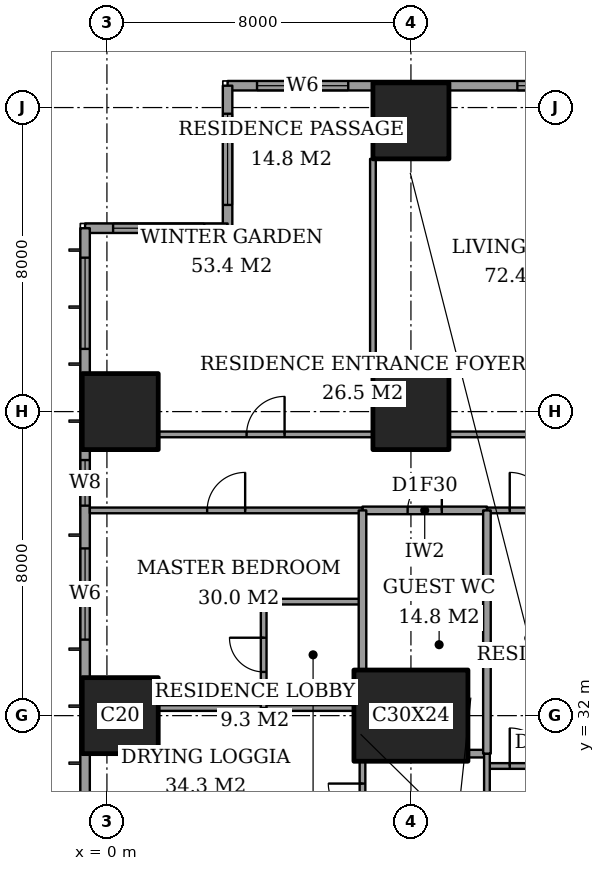
"""IFC4 building model, lengths in metres.
Left out: names, types, materials, properties, quantities, classifications, styles, units other than length and angle.
Written with IfcOpenShell. Run it as: python <this file> out.ifc"""

import sys

from ifc_helpers import new_model, si_unit, direction, frame, frame_2d, origin, origin_2d, place, context, subcontext, project, spatial, rectangle, extrude, element, fill, save


model = new_model("IFC4")
c1 = context("Model", 3, precision=1e-05, world=origin(), true_north=direction((0.0, 1.0)))
c2 = subcontext(c1, "Body", "Model", "MODEL_VIEW")
j1 = project(units=[si_unit("LENGTHUNIT", "METRE"), si_unit("PLANEANGLEUNIT", "RADIAN")], contexts=[c1])
p1 = place(None, origin())
s1 = spatial("IfcSite", under=j1, at=p1, CompositionType="ELEMENT")
p2 = place(p1, origin())
s2 = spatial("IfcBuilding", under=s1, at=p2, CompositionType="ELEMENT")
p3 = place(p2, frame((0.0, 0.0, 83.6)))
s3 = spatial("IfcBuildingStorey", under=s2, at=p3, CompositionType="ELEMENT", Elevation=83.6)
for number, where, z_axis, x_axis in (
    (1, (0.35, 32.0, 0.0), (0.0, 0.0, 1.0), (1.0, 0.0, 0.0)),
    (2, (0.35, 40.0, 0.0), (0.0, 0.0, 1.0), (1.0, 0.0, 0.0)),
):
    element("IfcColumn", number, at=place(p3, frame(where, z_axis=z_axis, x_axis=x_axis)), inside=s3, PredefinedType="COLUMN", context=c2, shape_type="SweptSolid", body=[
        extrude(rectangle(XDim=2.0, YDim=2.0, at=origin_2d()), origin(), (0.0, 0.0, 1.0), 3.6),
    ])
p4 = place(p3, frame((8.0, 32.0, 0.0), z_axis=(0.0, 0.0, 1.0), x_axis=(1.0, 0.0, 0.0)))
e3 = element("IfcColumn", 3, at=p4, inside=s3, PredefinedType="COLUMN", context=c2, shape_type="SweptSolid", body=[
    extrude(rectangle(XDim=3.0, YDim=2.4, at=origin_2d()), origin(), (0.0, 0.0, 1.0), 3.6),
])
for number, where, z_axis, x_axis in (
    (4, (8.0, 40.0, 0.0), (0.0, 0.0, 1.0), (1.0, 0.0, 0.0)),
    (5, (8.0, 47.65, 0.0), (0.0, 0.0, 1.0), (1.0, 0.0, 0.0)),
):
    element("IfcColumn", number, at=place(p3, frame(where, z_axis=z_axis, x_axis=x_axis)), inside=s3, PredefinedType="COLUMN", context=c2, shape_type="SweptSolid", body=[
        extrude(rectangle(XDim=2.0, YDim=2.0, at=origin_2d()), origin(), (0.0, 0.0, 1.0), 3.6),
    ])
p5 = place(p3, frame((24.575, 48.575, 0.0), z_axis=(0.0, 0.0, 1.0), x_axis=(-1.0, 0.0, 0.0)))
e6 = element("IfcWall", 6, at=p5, inside=s3, PredefinedType="SOLIDWALL", context=c2, shape_type="SweptSolid", body=[
    extrude(rectangle(XDim=21.4, YDim=0.25, at=frame_2d((10.7, 0.0))), origin(), (0.0, 0.0, 1.0), 3.6),
])
p6 = place(p5, frame((2.35, 0.0, 0.6)))
e7 = element("IfcOpeningElement", 7, at=p6, cuts=e6, PredefinedType="OPENING", context=c2, shape_type="SweptSolid", body=[
    extrude(rectangle(XDim=1.2, YDim=2.0, at=frame_2d((0.6, 1.0))), frame((0.0, 0.135, 0.0), z_axis=(0.0, -1.0, 0.0), x_axis=(1.0, 0.0, 0.0)), (0.0, 0.0, 1.0), 0.27),
])
p7 = place(p5, frame((4.25, 0.0, 0.6)))
e8 = element("IfcOpeningElement", 8, at=p7, cuts=e6, PredefinedType="OPENING", context=c2, shape_type="SweptSolid", body=[
    extrude(rectangle(XDim=1.2, YDim=2.0, at=frame_2d((0.6, 1.0))), frame((0.0, 0.135, 0.0), z_axis=(0.0, -1.0, 0.0), x_axis=(1.0, 0.0, 0.0)), (0.0, 0.0, 1.0), 0.27),
])
p8 = place(p5, frame((5.975, 0.0, 0.6)))
e9 = element("IfcOpeningElement", 9, at=p8, cuts=e6, PredefinedType="OPENING", context=c2, shape_type="SweptSolid", body=[
    extrude(rectangle(XDim=1.2, YDim=2.0, at=frame_2d((0.6, 1.0))), frame((0.0, 0.135, 0.0), z_axis=(0.0, -1.0, 0.0), x_axis=(1.0, 0.0, 0.0)), (0.0, 0.0, 1.0), 0.27),
])
p9 = place(p5, frame((11.375, 0.0, 0.6)))
e10 = element("IfcOpeningElement", 10, at=p9, cuts=e6, PredefinedType="OPENING", context=c2, shape_type="SweptSolid", body=[
    extrude(rectangle(XDim=2.4, YDim=2.0, at=frame_2d((1.2, 1.0))), frame((0.0, 0.135, 0.0), z_axis=(0.0, -1.0, 0.0), x_axis=(1.0, 0.0, 0.0)), (0.0, 0.0, 1.0), 0.27),
])
p10 = place(p5, frame((18.225, 0.0, 0.6)))
e11 = element("IfcOpeningElement", 11, at=p10, cuts=e6, PredefinedType="OPENING", context=c2, shape_type="SweptSolid", body=[
    extrude(rectangle(XDim=2.4, YDim=2.0, at=frame_2d((1.2, 1.0))), frame((0.0, 0.135, 0.0), z_axis=(0.0, -1.0, 0.0), x_axis=(1.0, 0.0, 0.0)), (0.0, 0.0, 1.0), 0.27),
])
p11 = place(p3, frame((3.175, 48.575, 0.0), z_axis=(0.0, 0.0, 1.0), x_axis=(0.0, -1.0, 0.0)))
e12 = element("IfcWall", 12, at=p11, inside=s3, PredefinedType="SOLIDWALL", context=c2, shape_type="SweptSolid", body=[
    extrude(rectangle(XDim=3.75, YDim=0.25, at=frame_2d((1.875, 0.0))), origin(), (0.0, 0.0, 1.0), 3.6),
])
p12 = place(p11, frame((0.738, 0.0, 0.6)))
e13 = element("IfcOpeningElement", 13, at=p12, cuts=e12, PredefinedType="OPENING", context=c2, shape_type="SweptSolid", body=[
    extrude(rectangle(XDim=2.4, YDim=2.0, at=frame_2d((1.2, 1.0))), frame((0.0, 0.135, 0.0), z_axis=(0.0, -1.0, 0.0), x_axis=(1.0, 0.0, 0.0)), (0.0, 0.0, 1.0), 0.27),
])
p13 = place(p3, frame((3.175, 44.825, 0.0), z_axis=(0.0, 0.0, 1.0), x_axis=(-1.0, 0.0, 0.0)))
e14 = element("IfcWall", 14, at=p13, inside=s3, PredefinedType="SOLIDWALL", context=c2, shape_type="SweptSolid", body=[
    extrude(rectangle(XDim=3.75, YDim=0.25, at=frame_2d((1.875, 0.0))), origin(), (0.0, 0.0, 1.0), 3.6),
])
p14 = place(p13, frame((0.613, 0.0, 0.6)))
e15 = element("IfcOpeningElement", 15, at=p14, cuts=e14, PredefinedType="OPENING", context=c2, shape_type="SweptSolid", body=[
    extrude(rectangle(XDim=2.4, YDim=2.0, at=frame_2d((1.2, 1.0))), frame((0.0, 0.135, 0.0), z_axis=(0.0, -1.0, 0.0), x_axis=(1.0, 0.0, 0.0)), (0.0, 0.0, 1.0), 0.27),
])
p15 = place(p3, frame((-0.575, 44.825, 0.0), z_axis=(0.0, 0.0, 1.0), x_axis=(0.0, -1.0, 0.0)))
e16 = element("IfcWall", 16, at=p15, inside=s3, PredefinedType="SOLIDWALL", context=c2, shape_type="SweptSolid", body=[
    extrude(rectangle(XDim=41.65, YDim=0.25, at=frame_2d((20.825, 0.0))), origin(), (0.0, 0.0, 1.0), 3.6),
])
p16 = place(p15, frame((0.775, 0.0, 0.6)))
e17 = element("IfcOpeningElement", 17, at=p16, cuts=e16, PredefinedType="OPENING", context=c2, shape_type="SweptSolid", body=[
    extrude(rectangle(XDim=2.4, YDim=2.0, at=frame_2d((1.2, 1.0))), frame((0.0, 0.135, 0.0), z_axis=(0.0, -1.0, 0.0), x_axis=(1.0, 0.0, 0.0)), (0.0, 0.0, 1.0), 0.27),
])
p17 = place(p15, frame((6.1, 0.0, 0.6)))
e18 = element("IfcOpeningElement", 18, at=p17, cuts=e16, PredefinedType="OPENING", context=c2, shape_type="SweptSolid", body=[
    extrude(rectangle(XDim=1.2, YDim=2.0, at=frame_2d((0.6, 1.0))), frame((0.0, 0.135, 0.0), z_axis=(0.0, -1.0, 0.0), x_axis=(1.0, 0.0, 0.0)), (0.0, 0.0, 1.0), 0.27),
])
p18 = place(p15, frame((8.425, 0.0, 0.6)))
e19 = element("IfcOpeningElement", 19, at=p18, cuts=e16, PredefinedType="OPENING", context=c2, shape_type="SweptSolid", body=[
    extrude(rectangle(XDim=2.4, YDim=2.0, at=frame_2d((1.2, 1.0))), frame((0.0, 0.135, 0.0), z_axis=(0.0, -1.0, 0.0), x_axis=(1.0, 0.0, 0.0)), (0.0, 0.0, 1.0), 0.27),
])
p19 = place(p15, frame((15.625, 0.0, 0.6)))
e20 = element("IfcOpeningElement", 20, at=p19, cuts=e16, PredefinedType="OPENING", context=c2, shape_type="SweptSolid", body=[
    extrude(rectangle(XDim=2.4, YDim=2.0, at=frame_2d((1.2, 1.0))), frame((0.0, 0.135, 0.0), z_axis=(0.0, -1.0, 0.0), x_axis=(1.0, 0.0, 0.0)), (0.0, 0.0, 1.0), 0.27),
])
p20 = place(p15, frame((23.625, 0.0, 0.6)))
e21 = element("IfcOpeningElement", 21, at=p20, cuts=e16, PredefinedType="OPENING", context=c2, shape_type="SweptSolid", body=[
    extrude(rectangle(XDim=2.4, YDim=2.0, at=frame_2d((1.2, 1.0))), frame((0.0, 0.135, 0.0), z_axis=(0.0, -1.0, 0.0), x_axis=(1.0, 0.0, 0.0)), (0.0, 0.0, 1.0), 0.27),
])
p21 = place(p15, frame((30.825, 0.0, 0.6)))
e22 = element("IfcOpeningElement", 22, at=p21, cuts=e16, PredefinedType="OPENING", context=c2, shape_type="SweptSolid", body=[
    extrude(rectangle(XDim=2.4, YDim=2.0, at=frame_2d((1.2, 1.0))), frame((0.0, 0.135, 0.0), z_axis=(0.0, -1.0, 0.0), x_axis=(1.0, 0.0, 0.0)), (0.0, 0.0, 1.0), 0.27),
])
p22 = place(p15, frame((34.5, 0.0, 0.6)))
e23 = element("IfcOpeningElement", 23, at=p22, cuts=e16, PredefinedType="OPENING", context=c2, shape_type="SweptSolid", body=[
    extrude(rectangle(XDim=1.2, YDim=2.0, at=frame_2d((0.6, 1.0))), frame((0.0, 0.135, 0.0), z_axis=(0.0, -1.0, 0.0), x_axis=(1.0, 0.0, 0.0)), (0.0, 0.0, 1.0), 0.27),
])
p23 = place(p15, frame((38.475, 0.0, 0.6)))
e24 = element("IfcOpeningElement", 24, at=p23, cuts=e16, PredefinedType="OPENING", context=c2, shape_type="SweptSolid", body=[
    extrude(rectangle(XDim=2.4, YDim=2.0, at=frame_2d((1.2, 1.0))), frame((0.0, 0.135, 0.0), z_axis=(0.0, -1.0, 0.0), x_axis=(1.0, 0.0, 0.0)), (0.0, 0.0, 1.0), 0.27),
])
p24 = place(p3, frame((10.0, 30.675, 0.0), z_axis=(0.0, 0.0, 1.0), x_axis=(1.0, 0.0, 0.0)))
e25 = element("IfcWall", 25, at=p24, inside=s3, PredefinedType="PARTITIONING", context=c2, shape_type="SweptSolid", body=[
    extrude(rectangle(XDim=4.4, YDim=0.15, at=frame_2d((2.2, 0.0))), origin(), (0.0, 0.0, 1.0), 3.35),
])
p25 = place(p24, frame((0.6, 0.0, 0.0)))
e26 = element("IfcOpeningElement", 26, at=p25, cuts=e25, PredefinedType="OPENING", context=c2, shape_type="SweptSolid", body=[
    extrude(rectangle(XDim=1.0, YDim=2.1, at=frame_2d((0.5, 1.05))), frame((0.0, 0.085, 0.0), z_axis=(0.0, -1.0, 0.0), x_axis=(1.0, 0.0, 0.0)), (0.0, 0.0, 1.0), 0.17),
])
p26 = place(p3, frame((9.5, 31.0, 0.0), z_axis=(0.0, 0.0, 1.0), x_axis=(1.0, 0.0, 0.0)))
e27 = element("IfcWall", 27, at=p26, inside=s3, PredefinedType="PARTITIONING", context=c2, shape_type="SweptSolid", body=[
    extrude(rectangle(XDim=0.5, YDim=0.2, at=frame_2d((0.25, 0.0))), origin(), (0.0, 0.0, 1.0), 3.35),
])
p27 = place(p3, frame((1.35, 32.2, 0.0), z_axis=(0.0, 0.0, 1.0), x_axis=(1.0, 0.0, 0.0)))
e28 = element("IfcWall", 28, at=p27, inside=s3, PredefinedType="PARTITIONING", context=c2, shape_type="SweptSolid", body=[
    extrude(rectangle(XDim=5.15, YDim=0.15, at=frame_2d((2.575, 0.0))), origin(), (0.0, 0.0, 1.0), 3.35),
])
p28 = place(p3, frame((4.125, 35.0, 0.0), z_axis=(0.0, 0.0, 1.0), x_axis=(1.0, 0.0, 0.0)))
e29 = element("IfcWall", 29, at=p28, inside=s3, PredefinedType="PARTITIONING", context=c2, shape_type="SweptSolid", body=[
    extrude(rectangle(XDim=2.6, YDim=0.15, at=frame_2d((1.3, 0.0))), origin(), (0.0, 0.0, 1.0), 3.35),
])
p29 = place(p3, frame((6.725, 37.4, 0.0), z_axis=(0.0, 0.0, 1.0), x_axis=(1.0, 0.0, 0.0)))
e30 = element("IfcWall", 30, at=p29, inside=s3, PredefinedType="PARTITIONING", context=c2, shape_type="SweptSolid", body=[
    extrude(rectangle(XDim=3.275, YDim=0.2, at=frame_2d((1.637, 0.0))), origin(), (0.0, 0.0, 1.0), 3.35),
])
p30 = place(p29, frame((1.188, 0.0, 0.0)))
e31 = element("IfcOpeningElement", 31, at=p30, cuts=e30, PredefinedType="OPENING", context=c2, shape_type="SweptSolid", body=[
    extrude(rectangle(XDim=0.9, YDim=2.1, at=frame_2d((0.45, 1.05))), frame((0.0, 0.11, 0.0), z_axis=(0.0, -1.0, 0.0), x_axis=(1.0, 0.0, 0.0)), (0.0, 0.0, 1.0), 0.22),
])
p31 = place(p3, frame((-0.45, 37.4, 0.0), z_axis=(0.0, 0.0, 1.0), x_axis=(1.0, 0.0, 0.0)))
e32 = element("IfcWall", 32, at=p31, inside=s3, PredefinedType="PARTITIONING", context=c2, shape_type="SweptSolid", body=[
    extrude(rectangle(XDim=7.175, YDim=0.15, at=frame_2d((3.587, 0.0))), origin(), (0.0, 0.0, 1.0), 3.35),
])
p32 = place(p31, frame((3.087, 0.0, 0.0)))
e33 = element("IfcOpeningElement", 33, at=p32, cuts=e32, PredefinedType="OPENING", context=c2, shape_type="SweptSolid", body=[
    extrude(rectangle(XDim=1.0, YDim=2.1, at=frame_2d((0.5, 1.05))), frame((0.0, 0.085, 0.0), z_axis=(0.0, -1.0, 0.0), x_axis=(1.0, 0.0, 0.0)), (0.0, 0.0, 1.0), 0.17),
])
p33 = place(p3, frame((10.0, 37.4, 0.0), z_axis=(0.0, 0.0, 1.0), x_axis=(1.0, 0.0, 0.0)))
e34 = element("IfcWall", 34, at=p33, inside=s3, PredefinedType="PARTITIONING", context=c2, shape_type="SweptSolid", body=[
    extrude(rectangle(XDim=14.561, YDim=0.15, at=frame_2d((7.281, 0.0))), origin(), (0.0, 0.0, 1.0), 3.35),
])
p34 = place(p33, frame((0.6, 0.0, 0.0)))
e35 = element("IfcOpeningElement", 35, at=p34, cuts=e34, PredefinedType="OPENING", context=c2, shape_type="SweptSolid", body=[
    extrude(rectangle(XDim=1.0, YDim=2.1, at=frame_2d((0.5, 1.05))), frame((0.0, 0.085, 0.0), z_axis=(0.0, -1.0, 0.0), x_axis=(1.0, 0.0, 0.0)), (0.0, 0.0, 1.0), 0.17),
])
p35 = place(p33, frame((4.6, 0.0, 0.0)))
e36 = element("IfcOpeningElement", 36, at=p35, cuts=e34, PredefinedType="OPENING", context=c2, shape_type="SweptSolid", body=[
    extrude(rectangle(XDim=1.0, YDim=2.1, at=frame_2d((0.5, 1.05))), frame((0.0, 0.085, 0.0), z_axis=(0.0, -1.0, 0.0), x_axis=(1.0, 0.0, 0.0)), (0.0, 0.0, 1.0), 0.17),
])
p36 = place(p33, frame((10.725, 0.0, 0.0)))
e37 = element("IfcOpeningElement", 37, at=p36, cuts=e34, PredefinedType="OPENING", context=c2, shape_type="SweptSolid", body=[
    extrude(rectangle(XDim=1.0, YDim=2.1, at=frame_2d((0.5, 1.05))), frame((0.0, 0.085, 0.0), z_axis=(0.0, -1.0, 0.0), x_axis=(1.0, 0.0, 0.0)), (0.0, 0.0, 1.0), 0.17),
])
p37 = place(p3, frame((1.35, 39.4, 0.0), z_axis=(0.0, 0.0, 1.0), x_axis=(1.0, 0.0, 0.0)))
e38 = element("IfcWall", 38, at=p37, inside=s3, PredefinedType="PARTITIONING", context=c2, shape_type="SweptSolid", body=[
    extrude(rectangle(XDim=5.65, YDim=0.15, at=frame_2d((2.825, 0.0))), origin(), (0.0, 0.0, 1.0), 3.35),
])
p38 = place(p37, frame((2.325, 0.0, 0.0)))
e39 = element("IfcOpeningElement", 39, at=p38, cuts=e38, PredefinedType="OPENING", context=c2, shape_type="SweptSolid", body=[
    extrude(rectangle(XDim=1.0, YDim=2.1, at=frame_2d((0.5, 1.05))), frame((0.0, 0.085, 0.0), z_axis=(0.0, -1.0, 0.0), x_axis=(1.0, 0.0, 0.0)), (0.0, 0.0, 1.0), 0.17),
])
p39 = place(p3, frame((9.0, 39.4, 0.0), z_axis=(0.0, 0.0, 1.0), x_axis=(1.0, 0.0, 0.0)))
e40 = element("IfcWall", 40, at=p39, inside=s3, PredefinedType="PARTITIONING", context=c2, shape_type="SweptSolid", body=[
    extrude(rectangle(XDim=6.0, YDim=0.15, at=frame_2d((3.0, 0.0))), origin(), (0.0, 0.0, 1.0), 3.35),
])
p40 = place(p39, frame((2.5, 0.0, 0.0)))
e41 = element("IfcOpeningElement", 41, at=p40, cuts=e40, PredefinedType="OPENING", context=c2, shape_type="SweptSolid", body=[
    extrude(rectangle(XDim=1.0, YDim=2.1, at=frame_2d((0.5, 1.05))), frame((0.0, 0.085, 0.0), z_axis=(0.0, -1.0, 0.0), x_axis=(1.0, 0.0, 0.0)), (0.0, 0.0, 1.0), 0.17),
])
p41 = place(p3, frame((4.125, 32.2, 0.0), z_axis=(0.0, 0.0, 1.0), x_axis=(0.0, 1.0, 0.0)))
e42 = element("IfcWall", 42, at=p41, inside=s3, PredefinedType="PARTITIONING", context=c2, shape_type="SweptSolid", body=[
    extrude(rectangle(XDim=2.8, YDim=0.15, at=frame_2d((1.4, 0.0))), origin(), (0.0, 0.0, 1.0), 3.35),
])
p42 = place(p41, frame((0.95, 0.0, 0.0)))
e43 = element("IfcOpeningElement", 43, at=p42, cuts=e42, PredefinedType="OPENING", context=c2, shape_type="SweptSolid", body=[
    extrude(rectangle(XDim=0.9, YDim=2.1, at=frame_2d((0.45, 1.05))), frame((0.0, 0.085, 0.0), z_axis=(0.0, -1.0, 0.0), x_axis=(1.0, 0.0, 0.0)), (0.0, 0.0, 1.0), 0.17),
])
p43 = place(p3, frame((6.725, 33.2, 0.0), z_axis=(0.0, 0.0, 1.0), x_axis=(0.0, 1.0, 0.0)))
e44 = element("IfcWall", 44, at=p43, inside=s3, PredefinedType="PARTITIONING", context=c2, shape_type="SweptSolid", body=[
    extrude(rectangle(XDim=4.2, YDim=0.2, at=frame_2d((2.1, 0.0))), origin(), (0.0, 0.0, 1.0), 3.35),
])
p44 = place(p3, frame((6.725, 28.35, 0.0), z_axis=(0.0, 0.0, 1.0), x_axis=(0.0, 1.0, 0.0)))
e45 = element("IfcWall", 45, at=p44, inside=s3, PredefinedType="PARTITIONING", context=c2, shape_type="SweptSolid", body=[
    extrude(rectangle(XDim=2.45, YDim=0.15, at=frame_2d((1.225, 0.0))), origin(), (0.0, 0.0, 1.0), 3.35),
])
p45 = place(p44, frame((0.962, 0.0, 0.0)))
e46 = element("IfcOpeningElement", 46, at=p45, cuts=e45, PredefinedType="OPENING", context=c2, shape_type="SweptSolid", body=[
    extrude(rectangle(XDim=0.9, YDim=2.1, at=frame_2d((0.45, 1.05))), frame((0.0, 0.085, 0.0), z_axis=(0.0, -1.0, 0.0), x_axis=(1.0, 0.0, 0.0)), (0.0, 0.0, 1.0), 0.17),
])
p46 = place(p3, frame((7.0, 41.0, 0.0), z_axis=(0.0, 0.0, 1.0), x_axis=(0.0, 1.0, 0.0)))
e47 = element("IfcWall", 47, at=p46, inside=s3, PredefinedType="PARTITIONING", context=c2, shape_type="SweptSolid", body=[
    extrude(rectangle(XDim=5.65, YDim=0.15, at=frame_2d((2.825, 0.0))), origin(), (0.0, 0.0, 1.0), 3.35),
])
p47 = place(p3, frame((10.0, 31.0, 0.0), z_axis=(0.0, 0.0, 1.0), x_axis=(0.0, 1.0, 0.0)))
e48 = element("IfcWall", 48, at=p47, inside=s3, PredefinedType="PARTITIONING", context=c2, shape_type="SweptSolid", body=[
    extrude(rectangle(XDim=6.4, YDim=0.2, at=frame_2d((3.2, 0.0))), origin(), (0.0, 0.0, 1.0), 3.35),
])
p48 = place(p3, frame((10.0, 28.0, 0.0), z_axis=(0.0, 0.0, 1.0), x_axis=(0.0, 1.0, 0.0)))
e49 = element("IfcWall", 49, at=p48, inside=s3, PredefinedType="PARTITIONING", context=c2, shape_type="SweptSolid", body=[
    extrude(rectangle(XDim=3.0, YDim=0.15, at=frame_2d((1.5, 0.0))), origin(), (0.0, 0.0, 1.0), 3.35),
])
p49 = place(p48, frame((0.837, 0.0, 0.0)))
e50 = element("IfcOpeningElement", 50, at=p49, cuts=e49, PredefinedType="OPENING", context=c2, shape_type="SweptSolid", body=[
    extrude(rectangle(XDim=1.0, YDim=2.1, at=frame_2d((0.5, 1.05))), frame((0.0, 0.085, 0.0), z_axis=(0.0, -1.0, 0.0), x_axis=(1.0, 0.0, 0.0)), (0.0, 0.0, 1.0), 0.17),
])
p50 = place(p9, origin())
e51 = element("IfcWindow", 51, at=p50, inside=s3, PartitioningType="SINGLE_PANEL", PredefinedType="WINDOW", context=c2, shape_type="SweptSolid", body=[
    extrude(rectangle(XDim=2.4, YDim=2.0, at=frame_2d((1.2, 1.0))), frame((0.0, 0.03, 0.0), z_axis=(0.0, -1.0, 0.0), x_axis=(1.0, 0.0, 0.0)), (0.0, 0.0, 1.0), 0.06),
])
fill(e10, e51)
p51 = place(p10, origin())
e52 = element("IfcWindow", 52, at=p51, inside=s3, PartitioningType="SINGLE_PANEL", PredefinedType="WINDOW", context=c2, shape_type="SweptSolid", body=[
    extrude(rectangle(XDim=2.4, YDim=2.0, at=frame_2d((1.2, 1.0))), frame((0.0, 0.03, 0.0), z_axis=(0.0, -1.0, 0.0), x_axis=(1.0, 0.0, 0.0)), (0.0, 0.0, 1.0), 0.06),
])
fill(e11, e52)
p52 = place(p12, origin())
e53 = element("IfcWindow", 53, at=p52, inside=s3, PartitioningType="SINGLE_PANEL", PredefinedType="WINDOW", context=c2, shape_type="SweptSolid", body=[
    extrude(rectangle(XDim=2.4, YDim=2.0, at=frame_2d((1.2, 1.0))), frame((0.0, 0.03, 0.0), z_axis=(0.0, -1.0, 0.0), x_axis=(1.0, 0.0, 0.0)), (0.0, 0.0, 1.0), 0.06),
])
fill(e13, e53)
p53 = place(p14, origin())
e54 = element("IfcWindow", 54, at=p53, inside=s3, PartitioningType="SINGLE_PANEL", PredefinedType="WINDOW", context=c2, shape_type="SweptSolid", body=[
    extrude(rectangle(XDim=2.4, YDim=2.0, at=frame_2d((1.2, 1.0))), frame((0.0, 0.03, 0.0), z_axis=(0.0, -1.0, 0.0), x_axis=(1.0, 0.0, 0.0)), (0.0, 0.0, 1.0), 0.06),
])
fill(e15, e54)
p54 = place(p16, origin())
e55 = element("IfcWindow", 55, at=p54, inside=s3, PartitioningType="SINGLE_PANEL", PredefinedType="WINDOW", context=c2, shape_type="SweptSolid", body=[
    extrude(rectangle(XDim=2.4, YDim=2.0, at=frame_2d((1.2, 1.0))), frame((0.0, 0.03, 0.0), z_axis=(0.0, -1.0, 0.0), x_axis=(1.0, 0.0, 0.0)), (0.0, 0.0, 1.0), 0.06),
])
fill(e17, e55)
p55 = place(p17, origin())
e56 = element("IfcWindow", 56, at=p55, inside=s3, PartitioningType="SINGLE_PANEL", PredefinedType="WINDOW", context=c2, shape_type="SweptSolid", body=[
    extrude(rectangle(XDim=1.2, YDim=2.0, at=frame_2d((0.6, 1.0))), frame((0.0, 0.03, 0.0), z_axis=(0.0, -1.0, 0.0), x_axis=(1.0, 0.0, 0.0)), (0.0, 0.0, 1.0), 0.06),
])
fill(e18, e56)
p56 = place(p18, origin())
e57 = element("IfcWindow", 57, at=p56, inside=s3, PartitioningType="SINGLE_PANEL", PredefinedType="WINDOW", context=c2, shape_type="SweptSolid", body=[
    extrude(rectangle(XDim=2.4, YDim=2.0, at=frame_2d((1.2, 1.0))), frame((0.0, 0.03, 0.0), z_axis=(0.0, -1.0, 0.0), x_axis=(1.0, 0.0, 0.0)), (0.0, 0.0, 1.0), 0.06),
])
fill(e19, e57)
p57 = place(p38, origin())
e58 = element("IfcDoor", 58, at=p57, inside=s3, OperationType="SINGLE_SWING_LEFT", PredefinedType="DOOR", context=c2, shape_type="SweptSolid", body=[
    extrude(rectangle(XDim=1.0, YDim=2.1, at=frame_2d((0.5, 1.05))), frame((0.0, 0.025, 0.0), z_axis=(0.0, -1.0, 0.0), x_axis=(1.0, 0.0, 0.0)), (0.0, 0.0, 1.0), 0.05),
])
fill(e39, e58)
p58 = place(p34, origin())
e59 = element("IfcDoor", 59, at=p58, inside=s3, OperationType="SINGLE_SWING_RIGHT", PredefinedType="DOOR", context=c2, shape_type="SweptSolid", body=[
    extrude(rectangle(XDim=1.0, YDim=2.1, at=frame_2d((0.5, 1.05))), frame((0.0, 0.025, 0.0), z_axis=(0.0, -1.0, 0.0), x_axis=(1.0, 0.0, 0.0)), (0.0, 0.0, 1.0), 0.05),
])
fill(e35, e59)
p59 = place(p42, origin())
e60 = element("IfcDoor", 60, at=p59, inside=s3, OperationType="SINGLE_SWING_LEFT", PredefinedType="DOOR", context=c2, shape_type="SweptSolid", body=[
    extrude(rectangle(XDim=0.9, YDim=2.1, at=frame_2d((0.45, 1.05))), frame((0.0, 0.025, 0.0), z_axis=(0.0, -1.0, 0.0), x_axis=(1.0, 0.0, 0.0)), (0.0, 0.0, 1.0), 0.05),
])
fill(e43, e60)
p60 = place(p32, origin())
e61 = element("IfcDoor", 61, at=p60, inside=s3, OperationType="SINGLE_SWING_LEFT", PredefinedType="DOOR", context=c2, shape_type="SweptSolid", body=[
    extrude(rectangle(XDim=1.0, YDim=2.1, at=frame_2d((0.5, 1.05))), frame((0.0, 0.025, 0.0), z_axis=(0.0, -1.0, 0.0), x_axis=(1.0, 0.0, 0.0)), (0.0, 0.0, 1.0), 0.05),
])
fill(e33, e61)
p61 = place(p45, origin())
e62 = element("IfcDoor", 62, at=p61, inside=s3, OperationType="SINGLE_SWING_LEFT", PredefinedType="DOOR", context=c2, shape_type="SweptSolid", body=[
    extrude(rectangle(XDim=0.9, YDim=2.1, at=frame_2d((0.45, 1.05))), frame((0.0, 0.025, 0.0), z_axis=(0.0, -1.0, 0.0), x_axis=(1.0, 0.0, 0.0)), (0.0, 0.0, 1.0), 0.05),
])
fill(e46, e62)
p62 = place(p30, origin())
e63 = element("IfcDoor", 63, at=p62, inside=s3, OperationType="SINGLE_SWING_LEFT", PredefinedType="DOOR", context=c2, shape_type="SweptSolid", body=[
    extrude(rectangle(XDim=0.9, YDim=2.1, at=frame_2d((0.45, 1.05))), frame((0.0, 0.025, 0.0), z_axis=(0.0, -1.0, 0.0), x_axis=(1.0, 0.0, 0.0)), (0.0, 0.0, 1.0), 0.05),
])
fill(e31, e63)
p63 = place(p25, origin())
e64 = element("IfcDoor", 64, at=p63, inside=s3, OperationType="SINGLE_SWING_RIGHT", PredefinedType="DOOR", context=c2, shape_type="SweptSolid", body=[
    extrude(rectangle(XDim=1.0, YDim=2.1, at=frame_2d((0.5, 1.05))), frame((0.0, 0.025, 0.0), z_axis=(0.0, -1.0, 0.0), x_axis=(1.0, 0.0, 0.0)), (0.0, 0.0, 1.0), 0.05),
])
fill(e26, e64)
save(model, sys.argv[1])
